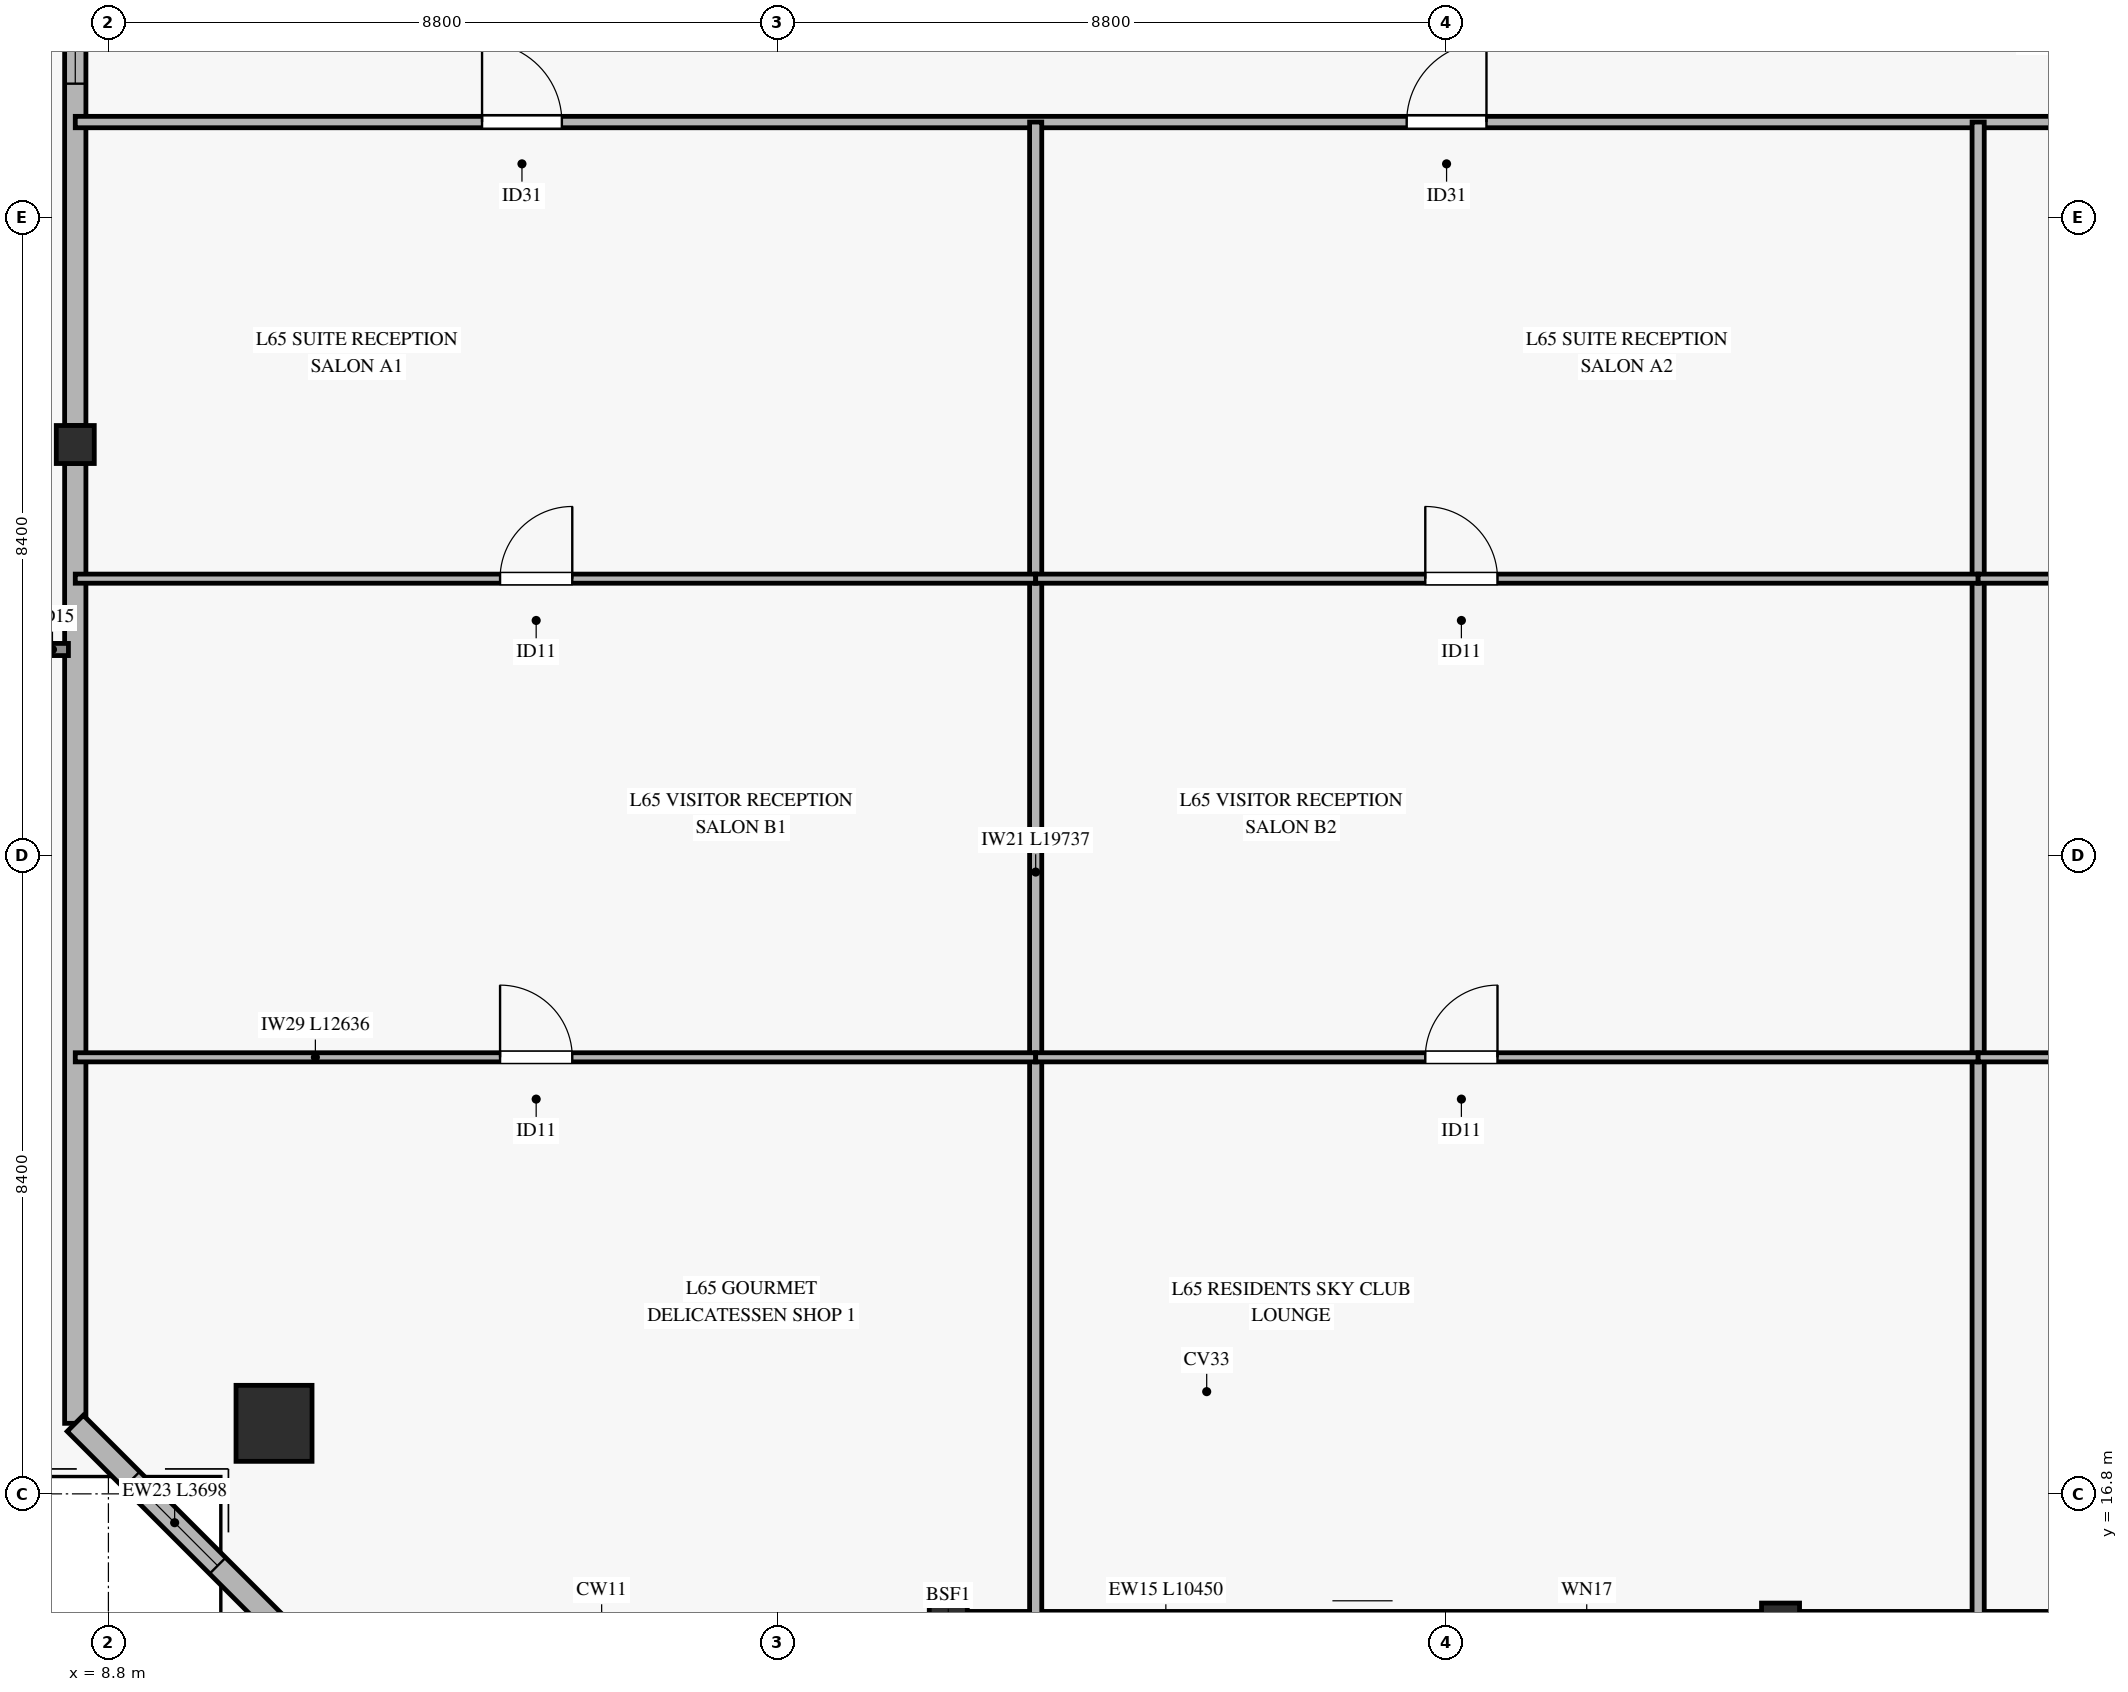
"""IFC4 building model, lengths in metres.
Left out: names, types, materials, properties, quantities, classifications, styles, units other than length and angle.
Written with IfcOpenShell. Run it as: python <this file> out.ifc"""

import sys

from ifc_helpers import new_model, si_unit, direction, frame, frame_2d, origin, origin_2d, place, context, subcontext, project, spatial, rectangle, hollow_rectangle, extrude, source, transform, mapped, element, fill, save


model = new_model("IFC4")
c1 = context("Model", 3, precision=1e-05, world=origin(), true_north=direction((0.0, 1.0)))
c2 = subcontext(c1, "Body", "Model", "MODEL_VIEW")
j1 = project(units=[si_unit("LENGTHUNIT", "METRE"), si_unit("PLANEANGLEUNIT", "RADIAN")], contexts=[c1])
p1 = place(None, origin())
s1 = spatial("IfcSite", under=j1, at=p1, CompositionType="ELEMENT")
p2 = place(p1, origin())
s2 = spatial("IfcBuilding", under=s1, at=p2, CompositionType="ELEMENT")
p3 = place(p2, frame((0.0, 0.0, 255.3)))
s3 = spatial("IfcBuildingStorey", under=s2, at=p3, CompositionType="ELEMENT", Elevation=255.3)
m1 = source(origin(), c2, "Body", "SweptSolid", [
    extrude(hollow_rectangle(XDim=1.0, YDim=1.0, WallThickness=0.045, at=origin_2d()), origin(), (0.0, 0.0, 1.0), 3.326),
])
p4 = place(p3, frame((10.979, 17.728, 0.0), z_axis=(0.110896020197, 0.266341268892, 0.957478146586), x_axis=(-0.92317473482, 0.384380552305, 0.0)))
e1 = element("IfcColumn", 1, at=p4, inside=s3, PredefinedType="COLUMN", context=c2, shape_type="MappedRepresentation", body=[
    mapped(m1, transform((0.0, 0.0, 0.0), x_axis=(1.0, 0.0, 0.0), y_axis=(0.0, 1.0, 0.0), z_axis=(0.0, 0.0, 1.0), scale=1.0)),
])
m2 = source(origin(), c2, "Body", "SweptSolid", [
    extrude(hollow_rectangle(XDim=0.5, YDim=0.5, WallThickness=0.024, at=origin_2d()), origin(), (0.0, 0.0, 1.0), 3.319),
])
for number, where, z_axis, x_axis in (
    (2, (19.85, 15.113, 0.0), (0.0, 0.281, 0.96), (-1.0, 0.0, 0.0)),
    (3, (30.8, 15.113, 0.0), (0.0, 0.281, 0.96), (-1.0, 0.0, 0.0)),
):
    element("IfcColumn", number, at=place(p3, frame(where, z_axis=z_axis, x_axis=x_axis)), inside=s3, PredefinedType="COLUMN", context=c2, shape_type="MappedRepresentation", body=[
        mapped(m2, transform((0.0, 0.0, 0.0), x_axis=(1.0, 0.0, 0.0), y_axis=(0.0, 1.0, 0.0), z_axis=(0.0, 0.0, 1.0), scale=1.0)),
    ])
m3 = source(origin(), c2, "Body", "SweptSolid", [
    extrude(hollow_rectangle(XDim=0.5, YDim=0.5, WallThickness=0.024, at=origin_2d()), origin(), (0.0, 0.0, 1.0), 3.245),
])
p5 = place(p3, frame((8.364, 30.607, 0.0), z_axis=(0.12788204807, 0.143303118572, 0.981381881832), x_axis=(-0.7461113674, 0.665821167759, 0.0)))
e4 = element("IfcColumn", 4, at=p5, inside=s3, PredefinedType="COLUMN", context=c2, shape_type="MappedRepresentation", body=[
    mapped(m3, transform((0.0, 0.0, 0.0), x_axis=(1.0, 0.0, 0.0), y_axis=(0.0, 1.0, 0.0), z_axis=(0.0, 0.0, 1.0), scale=1.0)),
])
p6 = place(p3, frame((20.1, 15.113, 0.0), z_axis=(0.0, 0.0, 1.0), x_axis=(1.0, 0.0, 0.0)))
e5 = element("IfcWall", 5, at=p6, inside=s3, PredefinedType="SOLIDWALL", context=c2, shape_type="SweptSolid", body=[
    extrude(rectangle(XDim=10.45, YDim=0.28, at=frame_2d((5.225, 0.0))), origin(), (0.0, 0.0, 1.0), 2.815),
])
p7 = place(p6, frame((4.3, 0.0, 0.0)))
e6 = element("IfcOpeningElement", 6, at=p7, cuts=e5, PredefinedType="OPENING", context=c2, shape_type="SweptSolid", body=[
    extrude(rectangle(XDim=1.8, YDim=2.25, at=frame_2d((0.9, 1.125))), frame((0.0, 0.15, 0.0), z_axis=(0.0, -1.0, 0.0), x_axis=(1.0, 0.0, 0.0)), (0.0, 0.0, 1.0), 0.3),
])
p8 = place(p6, frame((1.32, 0.0, 0.45)))
e7 = element("IfcOpeningElement", 7, at=p8, cuts=e5, PredefinedType="OPENING", context=c2, shape_type="SweptSolid", body=[
    extrude(rectangle(XDim=2.2, YDim=2.1, at=frame_2d((1.1, 1.05))), frame((0.0, 0.15, 0.0), z_axis=(0.0, -1.0, 0.0), x_axis=(1.0, 0.0, 0.0)), (0.0, 0.0, 1.0), 0.3),
])
p9 = place(p6, frame((7.35, 0.0, 0.45)))
e8 = element("IfcOpeningElement", 8, at=p9, cuts=e5, PredefinedType="OPENING", context=c2, shape_type="SweptSolid", body=[
    extrude(rectangle(XDim=1.6, YDim=2.0, at=frame_2d((0.8, 1.0))), frame((0.0, 0.15, 0.0), z_axis=(0.0, -1.0, 0.0), x_axis=(1.0, 0.0, 0.0)), (0.0, 0.0, 1.0), 0.3),
])
p10 = place(p3, frame((31.05, 15.113, 0.0), z_axis=(0.0, 0.0, 1.0), x_axis=(1.0, 0.0, 0.0)))
e9 = element("IfcWall", 9, at=p10, inside=s3, PredefinedType="SOLIDWALL", context=c2, shape_type="SweptSolid", body=[
    extrude(rectangle(XDim=6.25, YDim=0.28, at=frame_2d((3.125, 0.0))), origin(), (0.0, 0.0, 1.0), 2.815),
])
p11 = place(p3, frame((8.364, 17.728, 0.0), z_axis=(0.0, 0.0, 1.0), x_axis=(0.0, 1.0, 0.0)))
e10 = element("IfcWall", 10, at=p11, inside=s3, PredefinedType="SOLIDWALL", context=c2, shape_type="SweptSolid", body=[
    extrude(rectangle(XDim=12.629, YDim=0.28, at=frame_2d((6.314, 0.0))), origin(), (0.0, 0.0, 1.0), 2.815),
])
p12 = place(p3, frame((8.364, 30.857, 0.0), z_axis=(0.0, 0.0, 1.0), x_axis=(0.0, 1.0, 0.0)))
e11 = element("IfcWall", 11, at=p12, inside=s3, PredefinedType="SOLIDWALL", context=c2, shape_type="SweptSolid", body=[
    extrude(rectangle(XDim=12.628, YDim=0.28, at=frame_2d((6.314, 0.0))), origin(), (0.0, 0.0, 1.0), 2.815),
])
p13 = place(p12, frame((4.498, 0.0, 0.45)))
e12 = element("IfcOpeningElement", 12, at=p13, cuts=e11, PredefinedType="OPENING", context=c2, shape_type="SweptSolid", body=[
    extrude(rectangle(XDim=1.6, YDim=2.0, at=frame_2d((0.8, 1.0))), frame((0.0, 0.15, 0.0), z_axis=(0.0, -1.0, 0.0), x_axis=(1.0, 0.0, 0.0)), (0.0, 0.0, 1.0), 0.3),
])
p14 = place(p3, frame((8.364, 17.728, 0.0), z_axis=(0.0, 0.0, 1.0), x_axis=(0.707106781187, -0.707106781187, 0.0)))
e13 = element("IfcWall", 13, at=p14, inside=s3, PredefinedType="SOLIDWALL", context=c2, shape_type="SweptSolid", body=[
    extrude(rectangle(XDim=3.698, YDim=0.3, at=frame_2d((1.849, 0.0))), origin(), (0.0, 0.0, 1.0), 2.815),
])
p15 = place(p14, frame((1.049, 0.0, 0.45)))
e14 = element("IfcOpeningElement", 14, at=p15, cuts=e13, PredefinedType="OPENING", context=c2, shape_type="SweptSolid", body=[
    extrude(rectangle(XDim=1.6, YDim=2.0, at=frame_2d((0.8, 1.0))), frame((0.0, 0.16, 0.0), z_axis=(0.0, -1.0, 0.0), x_axis=(1.0, 0.0, 0.0)), (0.0, 0.0, 1.0), 0.32),
])
p16 = place(p3, frame((8.364, 34.85, 0.0), z_axis=(0.0, 0.0, 1.0), x_axis=(1.0, 0.0, 0.0)))
e15 = element("IfcWall", 15, at=p16, inside=s3, PredefinedType="PARTITIONING", context=c2, shape_type="SweptSolid", body=[
    extrude(rectangle(XDim=53.673, YDim=0.15, at=frame_2d((26.836, 0.0))), origin(), (0.0, 0.0, 1.0), 2.47),
])
p17 = place(p16, frame((5.352, 0.0, 0.0)))
e16 = element("IfcOpeningElement", 16, at=p17, cuts=e15, PredefinedType="OPENING", context=c2, shape_type="SweptSolid", body=[
    extrude(rectangle(XDim=1.05, YDim=2.15, at=frame_2d((0.525, 1.075))), frame((0.0, 0.085, 0.0), z_axis=(0.0, -1.0, 0.0), x_axis=(1.0, 0.0, 0.0)), (0.0, 0.0, 1.0), 0.17),
])
p18 = place(p16, frame((17.517, 0.0, 0.0)))
e17 = element("IfcOpeningElement", 17, at=p18, cuts=e15, PredefinedType="OPENING", context=c2, shape_type="SweptSolid", body=[
    extrude(rectangle(XDim=1.05, YDim=2.15, at=frame_2d((0.525, 1.075))), frame((0.0, 0.085, 0.0), z_axis=(0.0, -1.0, 0.0), x_axis=(1.0, 0.0, 0.0)), (0.0, 0.0, 1.0), 0.17),
])
p19 = place(p16, frame((29.537, 0.0, 0.0)))
e18 = element("IfcOpeningElement", 18, at=p19, cuts=e15, PredefinedType="OPENING", context=c2, shape_type="SweptSolid", body=[
    extrude(rectangle(XDim=1.05, YDim=2.15, at=frame_2d((0.525, 1.075))), frame((0.0, 0.085, 0.0), z_axis=(0.0, -1.0, 0.0), x_axis=(1.0, 0.0, 0.0)), (0.0, 0.0, 1.0), 0.17),
])
p20 = place(p16, frame((42.922, 0.0, 0.0)))
e19 = element("IfcOpeningElement", 19, at=p20, cuts=e15, PredefinedType="OPENING", context=c2, shape_type="SweptSolid", body=[
    extrude(rectangle(XDim=1.05, YDim=2.15, at=frame_2d((0.525, 1.075))), frame((0.0, 0.085, 0.0), z_axis=(0.0, -1.0, 0.0), x_axis=(1.0, 0.0, 0.0)), (0.0, 0.0, 1.0), 0.17),
])
for number, where, z_axis, x_axis in (
    (20, (21.0, 15.113, 0.0), (0.0, 0.0, 1.0), (0.0, 1.0, 0.0)),
    (21, (33.4, 15.113, 0.0), (0.0, 0.0, 1.0), (0.0, 1.0, 0.0)),
):
    element("IfcWall", number, at=place(p3, frame(where, z_axis=z_axis, x_axis=x_axis)), inside=s3, PredefinedType="PARTITIONING", context=c2, shape_type="SweptSolid", body=[
        extrude(rectangle(XDim=19.737, YDim=0.16, at=frame_2d((9.869, 0.0))), origin(), (0.0, 0.0, 1.0), 2.77),
    ])
p21 = place(p3, frame((8.364, 22.544, 0.0), z_axis=(0.0, 0.0, 1.0), x_axis=(1.0, 0.0, 0.0)))
e22 = element("IfcWall", 22, at=p21, inside=s3, PredefinedType="PARTITIONING", context=c2, shape_type="SweptSolid", body=[
    extrude(rectangle(XDim=12.636, YDim=0.12, at=frame_2d((6.318, 0.0))), origin(), (0.0, 0.0, 1.0), 2.47),
])
p22 = place(p21, frame((5.589, 0.0, 0.0)))
e23 = element("IfcOpeningElement", 23, at=p22, cuts=e22, PredefinedType="OPENING", context=c2, shape_type="SweptSolid", body=[
    extrude(rectangle(XDim=0.95, YDim=2.1, at=frame_2d((0.475, 1.05))), frame((0.0, 0.07, 0.0), z_axis=(0.0, -1.0, 0.0), x_axis=(1.0, 0.0, 0.0)), (0.0, 0.0, 1.0), 0.14),
])
p23 = place(p3, frame((8.364, 28.842, 0.0), z_axis=(0.0, 0.0, 1.0), x_axis=(1.0, 0.0, 0.0)))
e24 = element("IfcWall", 24, at=p23, inside=s3, PredefinedType="PARTITIONING", context=c2, shape_type="SweptSolid", body=[
    extrude(rectangle(XDim=12.636, YDim=0.12, at=frame_2d((6.318, 0.0))), origin(), (0.0, 0.0, 1.0), 2.47),
])
p24 = place(p23, frame((5.589, 0.0, 0.0)))
e25 = element("IfcOpeningElement", 25, at=p24, cuts=e24, PredefinedType="OPENING", context=c2, shape_type="SweptSolid", body=[
    extrude(rectangle(XDim=0.95, YDim=2.1, at=frame_2d((0.475, 1.05))), frame((0.0, 0.07, 0.0), z_axis=(0.0, -1.0, 0.0), x_axis=(1.0, 0.0, 0.0)), (0.0, 0.0, 1.0), 0.14),
])
p25 = place(p3, frame((21.0, 22.544, 0.0), z_axis=(0.0, 0.0, 1.0), x_axis=(1.0, 0.0, 0.0)))
e26 = element("IfcWall", 26, at=p25, inside=s3, PredefinedType="PARTITIONING", context=c2, shape_type="SweptSolid", body=[
    extrude(rectangle(XDim=12.4, YDim=0.12, at=frame_2d((6.2, 0.0))), origin(), (0.0, 0.0, 1.0), 2.47),
])
p26 = place(p25, frame((5.126, 0.0, 0.0)))
e27 = element("IfcOpeningElement", 27, at=p26, cuts=e26, PredefinedType="OPENING", context=c2, shape_type="SweptSolid", body=[
    extrude(rectangle(XDim=0.95, YDim=2.1, at=frame_2d((0.475, 1.05))), frame((0.0, 0.07, 0.0), z_axis=(0.0, -1.0, 0.0), x_axis=(1.0, 0.0, 0.0)), (0.0, 0.0, 1.0), 0.14),
])
p27 = place(p3, frame((21.0, 28.842, 0.0), z_axis=(0.0, 0.0, 1.0), x_axis=(1.0, 0.0, 0.0)))
e28 = element("IfcWall", 28, at=p27, inside=s3, PredefinedType="PARTITIONING", context=c2, shape_type="SweptSolid", body=[
    extrude(rectangle(XDim=12.4, YDim=0.12, at=frame_2d((6.2, 0.0))), origin(), (0.0, 0.0, 1.0), 2.47),
])
p28 = place(p27, frame((5.126, 0.0, 0.0)))
e29 = element("IfcOpeningElement", 29, at=p28, cuts=e28, PredefinedType="OPENING", context=c2, shape_type="SweptSolid", body=[
    extrude(rectangle(XDim=0.95, YDim=2.1, at=frame_2d((0.475, 1.05))), frame((0.0, 0.07, 0.0), z_axis=(0.0, -1.0, 0.0), x_axis=(1.0, 0.0, 0.0)), (0.0, 0.0, 1.0), 0.14),
])
p29 = place(p3, frame((33.4, 22.544, 0.0), z_axis=(0.0, 0.0, 1.0), x_axis=(1.0, 0.0, 0.0)))
e30 = element("IfcWall", 30, at=p29, inside=s3, PredefinedType="PARTITIONING", context=c2, shape_type="SweptSolid", body=[
    extrude(rectangle(XDim=11.4, YDim=0.12, at=frame_2d((5.7, 0.0))), origin(), (0.0, 0.0, 1.0), 2.47),
])
p30 = place(p29, frame((4.726, 0.0, 0.0)))
e31 = element("IfcOpeningElement", 31, at=p30, cuts=e30, PredefinedType="OPENING", context=c2, shape_type="SweptSolid", body=[
    extrude(rectangle(XDim=0.95, YDim=2.1, at=frame_2d((0.475, 1.05))), frame((0.0, 0.07, 0.0), z_axis=(0.0, -1.0, 0.0), x_axis=(1.0, 0.0, 0.0)), (0.0, 0.0, 1.0), 0.14),
])
p31 = place(p3, frame((33.4, 28.842, 0.0), z_axis=(0.0, 0.0, 1.0), x_axis=(1.0, 0.0, 0.0)))
e32 = element("IfcWall", 32, at=p31, inside=s3, PredefinedType="PARTITIONING", context=c2, shape_type="SweptSolid", body=[
    extrude(rectangle(XDim=11.4, YDim=0.12, at=frame_2d((5.7, 0.0))), origin(), (0.0, 0.0, 1.0), 2.47),
])
p32 = place(p31, frame((4.726, 0.0, 0.0)))
e33 = element("IfcOpeningElement", 33, at=p32, cuts=e32, PredefinedType="OPENING", context=c2, shape_type="SweptSolid", body=[
    extrude(rectangle(XDim=0.95, YDim=2.1, at=frame_2d((0.475, 1.05))), frame((0.0, 0.07, 0.0), z_axis=(0.0, -1.0, 0.0), x_axis=(1.0, 0.0, 0.0)), (0.0, 0.0, 1.0), 0.14),
])
m4 = source(origin(), c2, "Body", "SweptSolid", [
    extrude(rectangle(XDim=1.6, YDim=2.0, at=frame_2d((0.8, 1.0))), frame((0.0, 0.03, 0.0), z_axis=(0.0, -1.0, 0.0), x_axis=(1.0, 0.0, 0.0)), (0.0, 0.0, 1.0), 0.06),
])
p33 = place(p13, origin())
e34 = element("IfcWindow", 34, at=p33, inside=s3, PartitioningType="SINGLE_PANEL", PredefinedType="WINDOW", context=c2, shape_type="MappedRepresentation", body=[
    mapped(m4, transform((0.0, 0.0, 0.0), x_axis=(1.0, 0.0, 0.0), y_axis=(0.0, 1.0, 0.0), z_axis=(0.0, 0.0, 1.0), scale=1.0)),
])
fill(e12, e34)
p34 = place(p15, origin())
e35 = element("IfcWindow", 35, at=p34, inside=s3, PartitioningType="SINGLE_PANEL", PredefinedType="WINDOW", context=c2, shape_type="MappedRepresentation", body=[
    mapped(m4, transform((0.0, 0.0, 0.0), x_axis=(1.0, 0.0, 0.0), y_axis=(0.0, 1.0, 0.0), z_axis=(0.0, 0.0, 1.0), scale=1.0)),
])
fill(e14, e35)
m5 = source(origin(), c2, "Body", "SweptSolid", [
    extrude(rectangle(XDim=1.05, YDim=2.15, at=frame_2d((0.525, 1.075))), frame((0.0, 0.025, 0.0), z_axis=(0.0, -1.0, 0.0), x_axis=(1.0, 0.0, 0.0)), (0.0, 0.0, 1.0), 0.05),
])
p35 = place(p17, origin())
e36 = element("IfcDoor", 36, at=p35, inside=s3, OperationType="SINGLE_SWING_LEFT", PredefinedType="DOOR", context=c2, shape_type="MappedRepresentation", body=[
    mapped(m5, transform((0.0, 0.0, 0.0), x_axis=(1.0, 0.0, 0.0), y_axis=(0.0, 1.0, 0.0), z_axis=(0.0, 0.0, 1.0), scale=1.0)),
])
fill(e16, e36)
m6 = source(origin(), c2, "Body", "SweptSolid", [
    extrude(rectangle(XDim=0.95, YDim=2.1, at=frame_2d((0.475, 1.05))), frame((0.0, 0.025, 0.0), z_axis=(0.0, -1.0, 0.0), x_axis=(1.0, 0.0, 0.0)), (0.0, 0.0, 1.0), 0.05),
])
p36 = place(p24, origin())
e37 = element("IfcDoor", 37, at=p36, inside=s3, OperationType="SINGLE_SWING_RIGHT", PredefinedType="DOOR", context=c2, shape_type="MappedRepresentation", body=[
    mapped(m6, transform((0.0, 0.0, 0.0), x_axis=(1.0, 0.0, 0.0), y_axis=(0.0, 1.0, 0.0), z_axis=(0.0, 0.0, 1.0), scale=1.0)),
])
fill(e25, e37)
p37 = place(p22, origin())
e38 = element("IfcDoor", 38, at=p37, inside=s3, OperationType="SINGLE_SWING_LEFT", PredefinedType="DOOR", context=c2, shape_type="MappedRepresentation", body=[
    mapped(m6, transform((0.0, 0.0, 0.0), x_axis=(1.0, 0.0, 0.0), y_axis=(0.0, 1.0, 0.0), z_axis=(0.0, 0.0, 1.0), scale=1.0)),
])
fill(e23, e38)
p38 = place(p18, origin())
e39 = element("IfcDoor", 39, at=p38, inside=s3, OperationType="SINGLE_SWING_RIGHT", PredefinedType="DOOR", context=c2, shape_type="MappedRepresentation", body=[
    mapped(m5, transform((0.0, 0.0, 0.0), x_axis=(1.0, 0.0, 0.0), y_axis=(0.0, 1.0, 0.0), z_axis=(0.0, 0.0, 1.0), scale=1.0)),
])
fill(e17, e39)
p39 = place(p28, origin())
e40 = element("IfcDoor", 40, at=p39, inside=s3, OperationType="SINGLE_SWING_LEFT", PredefinedType="DOOR", context=c2, shape_type="MappedRepresentation", body=[
    mapped(m6, transform((0.0, 0.0, 0.0), x_axis=(1.0, 0.0, 0.0), y_axis=(0.0, 1.0, 0.0), z_axis=(0.0, 0.0, 1.0), scale=1.0)),
])
fill(e29, e40)
p40 = place(p26, origin())
e41 = element("IfcDoor", 41, at=p40, inside=s3, OperationType="SINGLE_SWING_RIGHT", PredefinedType="DOOR", context=c2, shape_type="MappedRepresentation", body=[
    mapped(m6, transform((0.0, 0.0, 0.0), x_axis=(1.0, 0.0, 0.0), y_axis=(0.0, 1.0, 0.0), z_axis=(0.0, 0.0, 1.0), scale=1.0)),
])
fill(e27, e41)
save(model, sys.argv[1])
